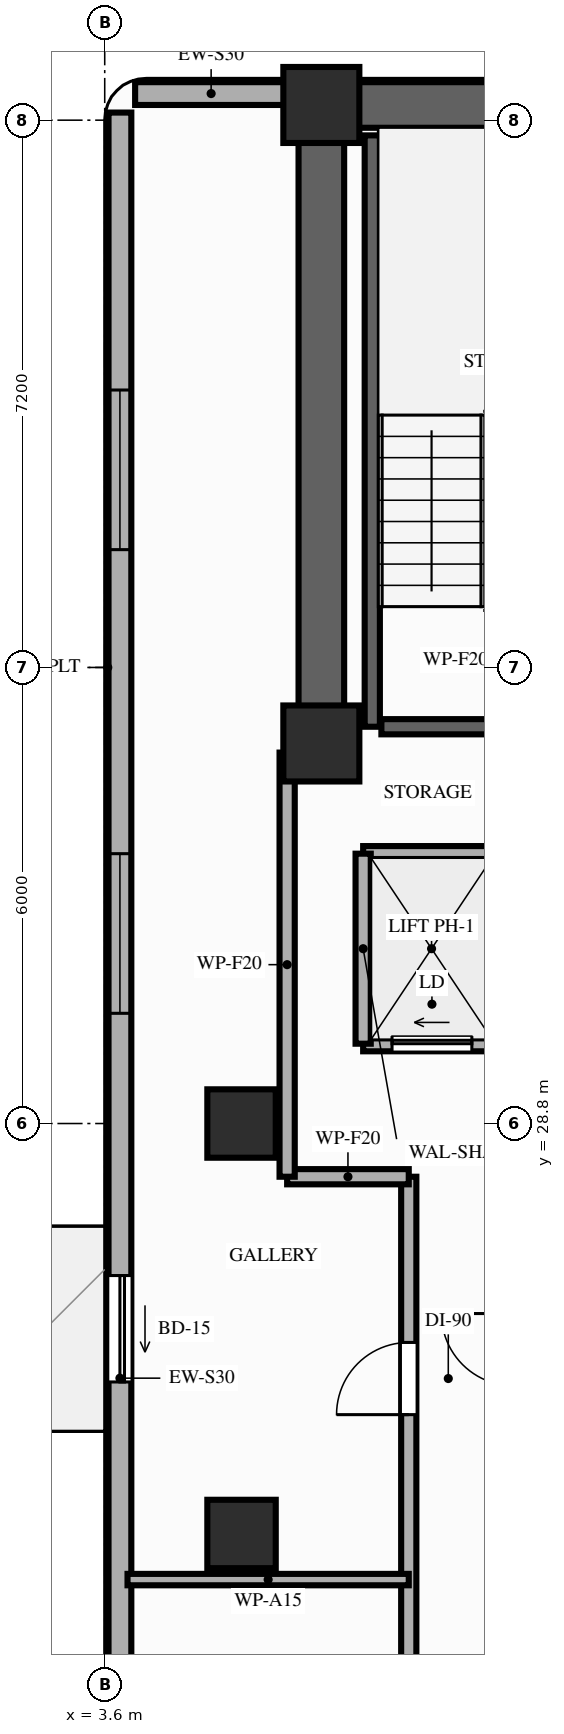
"""IFC4 building model, lengths in metres.
Left out: names, types, materials, properties, quantities, classifications, styles, units other than length and angle.
Written with IfcOpenShell. Run it as: python <this file> out.ifc"""

import sys

from ifc_helpers import new_model, si_unit, direction, frame, frame_2d, origin, origin_2d, place, context, subcontext, project, spatial, rectangle, extrude, element, fill, save


model = new_model("IFC4")
c1 = context("Model", 3, precision=1e-05, world=origin(), true_north=direction((0.0, 1.0)))
c2 = subcontext(c1, "Body", "Model", "MODEL_VIEW")
j1 = project(units=[si_unit("LENGTHUNIT", "METRE"), si_unit("PLANEANGLEUNIT", "RADIAN")], contexts=[c1])
p1 = place(None, origin())
s1 = spatial("IfcSite", under=j1, at=p1, CompositionType="ELEMENT")
p2 = place(p1, origin())
s2 = spatial("IfcBuilding", under=s1, at=p2, CompositionType="ELEMENT")
p3 = place(p2, frame((0.0, 0.0, 166.4)))
s3 = spatial("IfcBuildingStorey", under=s2, at=p3, CompositionType="ELEMENT", Elevation=166.4)
for number, where, z_axis, x_axis in (
    (1, (6.45, 33.8, 0.0), (0.0, 0.0, 1.0), (1.0, 0.0, 0.0)),
    (2, (6.45, 42.2, 0.0), (0.0, 0.0, 1.0), (1.0, 0.0, 0.0)),
):
    element("IfcColumn", number, at=place(p3, frame(where, z_axis=z_axis, x_axis=x_axis)), inside=s3, PredefinedType="COLUMN", context=c2, shape_type="SweptSolid", body=[
        extrude(rectangle(XDim=1.0, YDim=1.0, at=origin_2d()), origin(), (0.0, 0.0, 1.0), 3.2),
    ])
for number, where, z_axis, x_axis in (
    (3, (5.4, 23.4, 0.0), (0.0, 0.0, 1.0), (1.0, 0.0, 0.0)),
    (4, (5.4, 28.8, 0.0), (0.0, 0.0, 1.0), (1.0, 0.0, 0.0)),
):
    element("IfcColumn", number, at=place(p3, frame(where, z_axis=z_axis, x_axis=x_axis)), inside=s3, PredefinedType="COLUMN", context=c2, shape_type="SweptSolid", body=[
        extrude(rectangle(XDim=0.9, YDim=0.9, at=origin_2d()), origin(), (0.0, 0.0, 1.0), 3.2),
    ])
p4 = place(p3, frame((3.8, 42.1, 0.0), z_axis=(0.0, 0.0, 1.0), x_axis=(0.0, -1.0, 0.0)))
e5 = element("IfcWall", 5, at=p4, inside=s3, PredefinedType="STANDARD", context=c2, shape_type="SweptSolid", body=[
    extrude(rectangle(XDim=33.3, YDim=0.3, at=frame_2d((16.65, 0.0))), origin(), (0.0, 0.0, 1.0), 2.71),
])
p5 = place(p4, frame((25.47, 0.0, 0.0)))
e6 = element("IfcOpeningElement", 6, at=p5, cuts=e5, PredefinedType="OPENING", context=c2, shape_type="SweptSolid", body=[
    extrude(rectangle(XDim=1.4, YDim=2.1, at=frame_2d((0.7, 1.05))), frame((0.0, 0.16, 0.0), z_axis=(0.0, -1.0, 0.0), x_axis=(1.0, 0.0, 0.0)), (0.0, 0.0, 1.0), 0.32),
])
p6 = place(p4, frame((15.3, 0.0, 0.0)))
e7 = element("IfcOpeningElement", 7, at=p6, cuts=e5, PredefinedType="OPENING", context=c2, shape_type="SweptSolid", body=[
    extrude(rectangle(XDim=1.4, YDim=2.1, at=frame_2d((0.7, 1.05))), frame((0.0, 0.16, 0.0), z_axis=(0.0, -1.0, 0.0), x_axis=(1.0, 0.0, 0.0)), (0.0, 0.0, 1.0), 0.32),
])
p7 = place(p4, frame((29.33, 0.0, 0.85)))
e8 = element("IfcOpeningElement", 8, at=p7, cuts=e5, PredefinedType="OPENING", context=c2, shape_type="SweptSolid", body=[
    extrude(rectangle(XDim=2.1, YDim=1.61, at=frame_2d((1.05, 0.805))), frame((0.0, 0.16, 0.0), z_axis=(0.0, -1.0, 0.0), x_axis=(1.0, 0.0, 0.0)), (0.0, 0.0, 1.0), 0.32),
])
p8 = place(p4, frame((20.35, 0.0, 0.85)))
e9 = element("IfcOpeningElement", 9, at=p8, cuts=e5, PredefinedType="OPENING", context=c2, shape_type="SweptSolid", body=[
    extrude(rectangle(XDim=2.1, YDim=1.61, at=frame_2d((1.05, 0.805))), frame((0.0, 0.16, 0.0), z_axis=(0.0, -1.0, 0.0), x_axis=(1.0, 0.0, 0.0)), (0.0, 0.0, 1.0), 0.32),
])
p9 = place(p4, frame((9.75, 0.0, 0.85)))
e10 = element("IfcOpeningElement", 10, at=p9, cuts=e5, PredefinedType="OPENING", context=c2, shape_type="SweptSolid", body=[
    extrude(rectangle(XDim=2.1, YDim=1.61, at=frame_2d((1.05, 0.805))), frame((0.0, 0.16, 0.0), z_axis=(0.0, -1.0, 0.0), x_axis=(1.0, 0.0, 0.0)), (0.0, 0.0, 1.0), 0.32),
])
p10 = place(p4, frame((3.65, 0.0, 0.85)))
e11 = element("IfcOpeningElement", 11, at=p10, cuts=e5, PredefinedType="OPENING", context=c2, shape_type="SweptSolid", body=[
    extrude(rectangle(XDim=2.1, YDim=1.61, at=frame_2d((1.05, 0.805))), frame((0.0, 0.16, 0.0), z_axis=(0.0, -1.0, 0.0), x_axis=(1.0, 0.0, 0.0)), (0.0, 0.0, 1.0), 0.32),
])
p11 = place(p3, frame((6.0, 42.35, 0.0), z_axis=(0.0, 0.0, 1.0), x_axis=(-1.0, 0.0, 0.0)))
e12 = element("IfcWall", 12, at=p11, inside=s3, PredefinedType="STANDARD", context=c2, shape_type="SweptSolid", body=[
    extrude(rectangle(XDim=2.0, YDim=0.3, at=frame_2d((1.0, 0.0))), origin(), (0.0, 0.0, 1.0), 3.02),
])
p12 = place(p3, frame((6.45, 42.2, 0.0), z_axis=(0.0, 0.0, 1.0), x_axis=(1.0, 0.0, 0.0)))
e13 = element("IfcWall", 13, at=p12, inside=s3, PredefinedType="SHEAR", context=c2, shape_type="SweptSolid", body=[
    extrude(rectangle(XDim=20.45, YDim=0.6, at=frame_2d((10.225, 0.0))), origin(), (0.0, 0.0, 1.0), 3.02),
])
p13 = place(p3, frame((6.45, 33.8, 0.0), z_axis=(0.0, 0.0, 1.0), x_axis=(0.0, 1.0, 0.0)))
e14 = element("IfcWall", 14, at=p13, inside=s3, PredefinedType="SHEAR", context=c2, shape_type="SweptSolid", body=[
    extrude(rectangle(XDim=7.95, YDim=0.6, at=frame_2d((3.975, 0.0))), origin(), (0.0, 0.0, 1.0), 3.02),
])
p14 = place(p3, frame((7.12, 34.02, 0.0), z_axis=(0.0, 0.0, 1.0), x_axis=(0.0, 1.0, 0.0)))
e15 = element("IfcWall", 15, at=p14, inside=s3, PredefinedType="SHEAR", context=c2, shape_type="SweptSolid", body=[
    extrude(rectangle(XDim=7.78, YDim=0.2, at=frame_2d((3.89, 0.0))), origin(), (0.0, 0.0, 1.0), 3.02),
])
p15 = place(p3, frame((7.24, 34.02, 0.0), z_axis=(0.0, 0.0, 1.0), x_axis=(1.0, 0.0, 0.0)))
e16 = element("IfcWall", 16, at=p15, inside=s3, PredefinedType="SHEAR", context=c2, shape_type="SweptSolid", body=[
    extrude(rectangle(XDim=2.88, YDim=0.2, at=frame_2d((1.44, 0.0))), origin(), (0.0, 0.0, 1.0), 3.02),
])
p16 = place(p3, frame((7.0, 29.85, 0.0), z_axis=(0.0, 0.0, 1.0), x_axis=(1.0, 0.0, 0.0)))
e17 = element("IfcWall", 17, at=p16, inside=s3, PredefinedType="MOVABLE", context=c2, shape_type="SweptSolid", body=[
    extrude(rectangle(XDim=5.55, YDim=0.2, at=frame_2d((2.775, 0.0))), origin(), (0.0, 0.0, 1.0), 3.02),
])
p17 = place(p16, frame((0.38, 0.0, 0.0)))
e18 = element("IfcOpeningElement", 18, at=p17, cuts=e17, PredefinedType="OPENING", context=c2, shape_type="SweptSolid", body=[
    extrude(rectangle(XDim=1.05, YDim=2.15, at=frame_2d((0.525, 1.075))), frame((0.0, 0.11, 0.0), z_axis=(0.0, -1.0, 0.0), x_axis=(1.0, 0.0, 0.0)), (0.0, 0.0, 1.0), 0.22),
])
p18 = place(p16, frame((2.28, 0.0, 0.0)))
e19 = element("IfcOpeningElement", 19, at=p18, cuts=e17, PredefinedType="OPENING", context=c2, shape_type="SweptSolid", body=[
    extrude(rectangle(XDim=1.05, YDim=2.15, at=frame_2d((0.525, 1.075))), frame((0.0, 0.11, 0.0), z_axis=(0.0, -1.0, 0.0), x_axis=(1.0, 0.0, 0.0)), (0.0, 0.0, 1.0), 0.22),
])
p19 = place(p16, frame((4.17, 0.0, 0.0)))
e20 = element("IfcOpeningElement", 20, at=p19, cuts=e17, PredefinedType="OPENING", context=c2, shape_type="SweptSolid", body=[
    extrude(rectangle(XDim=1.05, YDim=2.15, at=frame_2d((0.525, 1.075))), frame((0.0, 0.11, 0.0), z_axis=(0.0, -1.0, 0.0), x_axis=(1.0, 0.0, 0.0)), (0.0, 0.0, 1.0), 0.22),
])
p20 = place(p3, frame((7.0, 32.35, 0.0), z_axis=(0.0, 0.0, 1.0), x_axis=(1.0, 0.0, 0.0)))
e21 = element("IfcWall", 21, at=p20, inside=s3, PredefinedType="MOVABLE", context=c2, shape_type="SweptSolid", body=[
    extrude(rectangle(XDim=5.55, YDim=0.2, at=frame_2d((2.775, 0.0))), origin(), (0.0, 0.0, 1.0), 3.02),
])
p21 = place(p3, frame((7.0, 29.85, 0.0), z_axis=(0.0, 0.0, 1.0), x_axis=(0.0, 1.0, 0.0)))
e22 = element("IfcWall", 22, at=p21, inside=s3, PredefinedType="MOVABLE", context=c2, shape_type="SweptSolid", body=[
    extrude(rectangle(XDim=2.5, YDim=0.2, at=frame_2d((1.25, 0.0))), origin(), (0.0, 0.0, 1.0), 3.02),
])
p22 = place(p3, frame((7.6, 14.5, 0.0), z_axis=(0.0, 0.0, 1.0), x_axis=(0.0, 1.0, 0.0)))
e23 = element("IfcWall", 23, at=p22, inside=s3, PredefinedType="PARTITIONING", context=c2, shape_type="SweptSolid", body=[
    extrude(rectangle(XDim=13.6, YDim=0.2, at=frame_2d((6.8, 0.0))), origin(), (0.0, 0.0, 1.0), 2.45),
])
p23 = place(p22, frame((1.36, 0.0, 0.0)))
e24 = element("IfcOpeningElement", 24, at=p23, cuts=e23, PredefinedType="OPENING", context=c2, shape_type="SweptSolid", body=[
    extrude(rectangle(XDim=0.95, YDim=2.15, at=frame_2d((0.475, 1.075))), frame((0.0, 0.11, 0.0), z_axis=(0.0, -1.0, 0.0), x_axis=(1.0, 0.0, 0.0)), (0.0, 0.0, 1.0), 0.22),
])
p24 = place(p22, frame((5.5, 0.0, 0.0)))
e25 = element("IfcOpeningElement", 25, at=p24, cuts=e23, PredefinedType="OPENING", context=c2, shape_type="SweptSolid", body=[
    extrude(rectangle(XDim=0.95, YDim=2.15, at=frame_2d((0.475, 1.075))), frame((0.0, 0.11, 0.0), z_axis=(0.0, -1.0, 0.0), x_axis=(1.0, 0.0, 0.0)), (0.0, 0.0, 1.0), 0.22),
])
p25 = place(p22, frame((10.47, 0.0, 0.0)))
e26 = element("IfcOpeningElement", 26, at=p25, cuts=e23, PredefinedType="OPENING", context=c2, shape_type="SweptSolid", body=[
    extrude(rectangle(XDim=0.95, YDim=2.15, at=frame_2d((0.475, 1.075))), frame((0.0, 0.11, 0.0), z_axis=(0.0, -1.0, 0.0), x_axis=(1.0, 0.0, 0.0)), (0.0, 0.0, 1.0), 0.22),
])
p26 = place(p3, frame((6.0, 28.1, 0.0), z_axis=(0.0, 0.0, 1.0), x_axis=(1.0, 0.0, 0.0)))
e27 = element("IfcWall", 27, at=p26, inside=s3, PredefinedType="PARTITIONING", context=c2, shape_type="SweptSolid", body=[
    extrude(rectangle(XDim=1.6, YDim=0.2, at=frame_2d((0.8, 0.0))), origin(), (0.0, 0.0, 1.0), 3.02),
])
p27 = place(p3, frame((6.0, 28.1, 0.0), z_axis=(0.0, 0.0, 1.0), x_axis=(0.0, 1.0, 0.0)))
e28 = element("IfcWall", 28, at=p27, inside=s3, PredefinedType="PARTITIONING", context=c2, shape_type="SweptSolid", body=[
    extrude(rectangle(XDim=5.58, YDim=0.2, at=frame_2d((2.79, 0.0))), origin(), (0.0, 0.0, 1.0), 2.45),
])
p28 = place(p3, frame((3.9, 22.8, 0.0), z_axis=(0.0, 0.0, 1.0), x_axis=(1.0, 0.0, 0.0)))
e29 = element("IfcWall", 29, at=p28, inside=s3, PredefinedType="PARTITIONING", context=c2, shape_type="SweptSolid", body=[
    extrude(rectangle(XDim=3.7, YDim=0.15, at=frame_2d((1.85, 0.0))), origin(), (0.0, 0.0, 1.0), 2.45),
])
p29 = place(p6, origin())
e30 = element("IfcDoor", 30, at=p29, inside=s3, OperationType="SLIDING_TO_RIGHT", PredefinedType="DOOR", context=c2, shape_type="SweptSolid", body=[
    extrude(rectangle(XDim=1.4, YDim=2.1, at=frame_2d((0.7, 1.05))), frame((0.0, 0.025, 0.0), z_axis=(0.0, -1.0, 0.0), x_axis=(1.0, 0.0, 0.0)), (0.0, 0.0, 1.0), 0.05),
])
fill(e7, e30)
p30 = place(p9, origin())
e31 = element("IfcWindow", 31, at=p30, inside=s3, PartitioningType="SINGLE_PANEL", PredefinedType="WINDOW", context=c2, shape_type="SweptSolid", body=[
    extrude(rectangle(XDim=2.1, YDim=1.61, at=frame_2d((1.05, 0.805))), frame((0.0, 0.03, 0.0), z_axis=(0.0, -1.0, 0.0), x_axis=(1.0, 0.0, 0.0)), (0.0, 0.0, 1.0), 0.06),
])
fill(e10, e31)
p31 = place(p10, origin())
e32 = element("IfcWindow", 32, at=p31, inside=s3, PartitioningType="SINGLE_PANEL", PredefinedType="WINDOW", context=c2, shape_type="SweptSolid", body=[
    extrude(rectangle(XDim=2.1, YDim=1.61, at=frame_2d((1.05, 0.805))), frame((0.0, 0.03, 0.0), z_axis=(0.0, -1.0, 0.0), x_axis=(1.0, 0.0, 0.0)), (0.0, 0.0, 1.0), 0.06),
])
fill(e11, e32)
p32 = place(p17, origin())
e33 = element("IfcDoor", 33, at=p32, inside=s3, OperationType="SLIDING_TO_LEFT", PredefinedType="DOOR", context=c2, shape_type="SweptSolid", body=[
    extrude(rectangle(XDim=1.05, YDim=2.15, at=frame_2d((0.525, 1.075))), frame((0.0, 0.025, 0.0), z_axis=(0.0, -1.0, 0.0), x_axis=(1.0, 0.0, 0.0)), (0.0, 0.0, 1.0), 0.05),
])
fill(e18, e33)
p33 = place(p25, origin())
e34 = element("IfcDoor", 34, at=p33, inside=s3, OperationType="SINGLE_SWING_LEFT", PredefinedType="DOOR", context=c2, shape_type="SweptSolid", body=[
    extrude(rectangle(XDim=0.95, YDim=2.15, at=frame_2d((0.475, 1.075))), frame((0.0, 0.025, 0.0), z_axis=(0.0, -1.0, 0.0), x_axis=(1.0, 0.0, 0.0)), (0.0, 0.0, 1.0), 0.05),
])
fill(e26, e34)
save(model, sys.argv[1])
